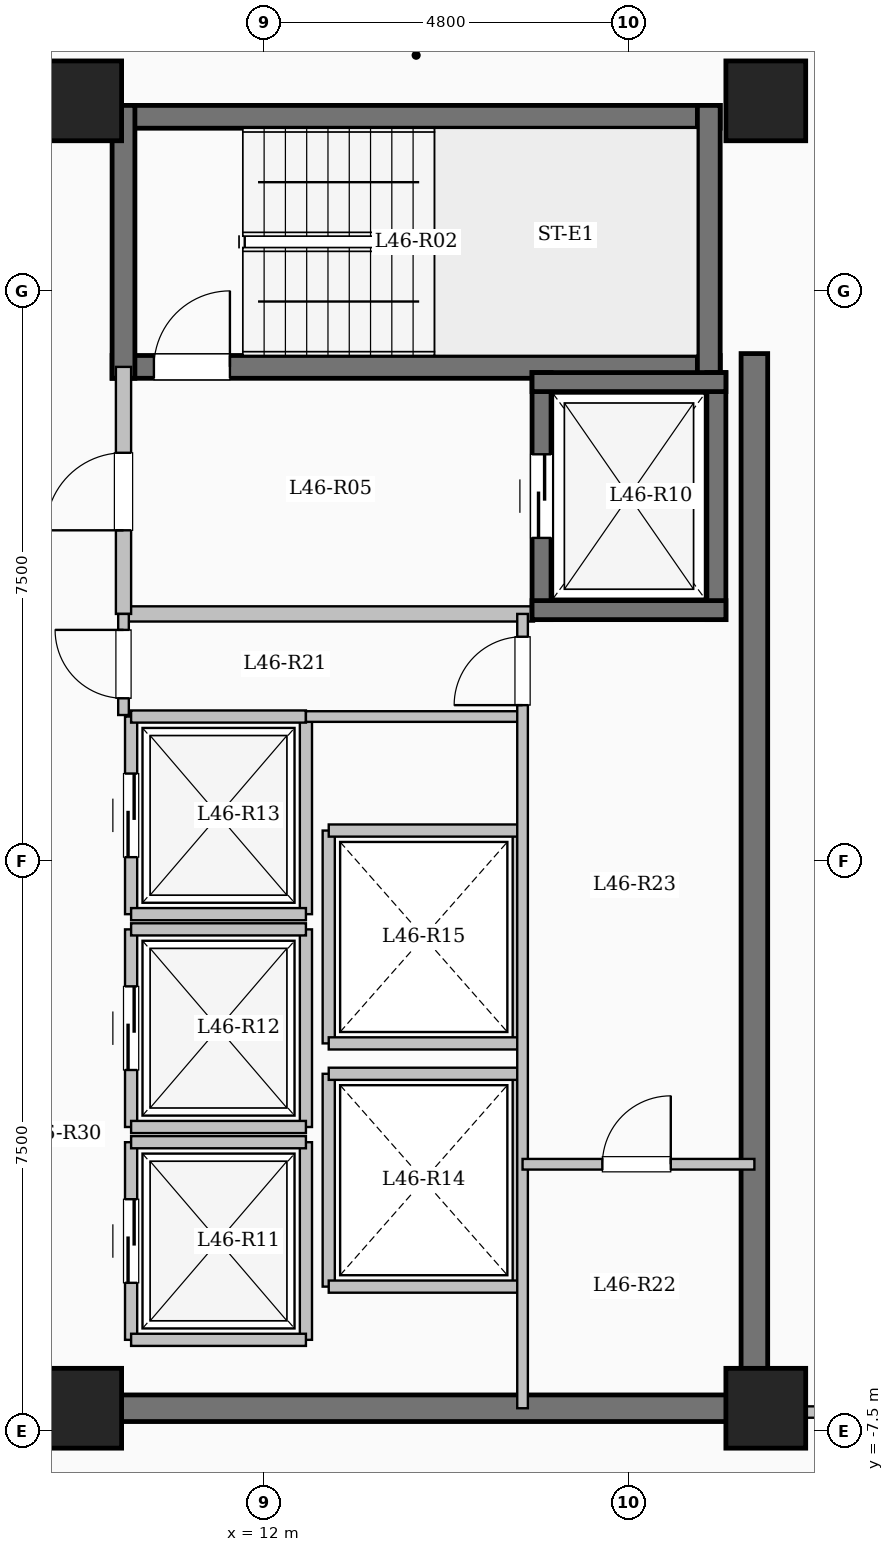
"""IFC4 building model, lengths in metres.
Left out: names, types, materials, properties, quantities, classifications, styles, units other than length and angle.
Written with IfcOpenShell. Run it as: python <this file> out.ifc"""

import sys

from ifc_helpers import new_model, si_unit, direction, frame, frame_2d, origin, origin_2d, place, context, subcontext, project, spatial, rectangle, extrude, element, fill, save


model = new_model("IFC4")
c1 = context("Model", 3, precision=1e-05, world=origin(), true_north=direction((0.0, 1.0)))
c2 = subcontext(c1, "Body", "Model", "MODEL_VIEW")
j1 = project(units=[si_unit("LENGTHUNIT", "METRE"), si_unit("PLANEANGLEUNIT", "RADIAN")], contexts=[c1])
p1 = place(None, origin())
s1 = spatial("IfcSite", under=j1, at=p1, CompositionType="ELEMENT")
p2 = place(p1, origin())
s2 = spatial("IfcBuilding", under=s1, at=p2, CompositionType="ELEMENT")
p3 = place(p2, frame((0.0, 0.0, 169.45)))
s3 = spatial("IfcBuildingStorey", under=s2, at=p3, CompositionType="ELEMENT", Elevation=169.45)
for number, where, z_axis, x_axis in (
    (1, (9.6, -7.2, 0.0), (0.0, 0.0, 1.0), (1.0, 0.0, 0.0)),
    (2, (9.6, 10.0, 0.0), (0.0, 0.0, 1.0), (1.0, 0.0, 0.0)),
    (3, (18.6, -7.2, 0.0), (0.0, 0.0, 1.0), (1.0, 0.0, 0.0)),
    (4, (18.6, 10.0, 0.0), (0.0, 0.0, 1.0), (1.0, 0.0, 0.0)),
):
    element("IfcColumn", number, at=place(p3, frame(where, z_axis=z_axis, x_axis=x_axis)), inside=s3, PredefinedType="COLUMN", context=c2, shape_type="SweptSolid", body=[
        extrude(rectangle(XDim=1.05, YDim=1.05, at=origin_2d()), origin(), (0.0, 0.0, 1.0), 3.35),
    ])
p4 = place(p3, frame((10.0, 9.79, 0.0), z_axis=(0.0, 0.0, 1.0), x_axis=(1.0, 0.0, 0.0)))
e5 = element("IfcWall", 5, at=p4, inside=s3, PredefinedType="SHEAR", context=c2, shape_type="SweptSolid", body=[
    extrude(rectangle(XDim=8.0, YDim=0.3, at=frame_2d((4.0, 0.0))), origin(), (0.0, 0.0, 1.0), 3.35),
])
p5 = place(p3, frame((10.0, 6.5, 0.0), z_axis=(0.0, 0.0, 1.0), x_axis=(1.0, 0.0, 0.0)))
e6 = element("IfcWall", 6, at=p5, inside=s3, PredefinedType="SHEAR", context=c2, shape_type="SweptSolid", body=[
    extrude(rectangle(XDim=8.0, YDim=0.3, at=frame_2d((4.0, 0.0))), origin(), (0.0, 0.0, 1.0), 3.35),
])
p6 = place(p5, frame((0.55, 0.0, 0.0)))
e7 = element("IfcOpeningElement", 7, at=p6, cuts=e6, PredefinedType="OPENING", context=c2, shape_type="SweptSolid", body=[
    extrude(rectangle(XDim=1.0, YDim=2.15, at=frame_2d((0.5, 1.075))), frame((0.0, 0.16, 0.0), z_axis=(0.0, -1.0, 0.0), x_axis=(1.0, 0.0, 0.0)), (0.0, 0.0, 1.0), 0.32),
])
for number, where, z_axis, x_axis in (
    (8, (10.15, 6.35, 0.0), (0.0, 0.0, 1.0), (0.0, 1.0, 0.0)),
    (9, (17.85, 6.35, 0.0), (0.0, 0.0, 1.0), (0.0, 1.0, 0.0)),
):
    element("IfcWall", number, at=place(p3, frame(where, z_axis=z_axis, x_axis=x_axis)), inside=s3, PredefinedType="SHEAR", context=c2, shape_type="SweptSolid", body=[
        extrude(rectangle(XDim=3.59, YDim=0.3, at=frame_2d((1.795, 0.0))), origin(), (0.0, 0.0, 1.0), 3.35),
    ])
p7 = place(p3, frame((10.15, 3.25, 0.0), z_axis=(0.0, 0.0, 1.0), x_axis=(1.0, 0.0, 0.0)))
e10 = element("IfcWall", 10, at=p7, inside=s3, PredefinedType="SOLIDWALL", context=c2, shape_type="SweptSolid", body=[
    extrude(rectangle(XDim=5.4, YDim=0.2, at=frame_2d((2.7, 0.0))), origin(), (0.0, 0.0, 1.0), 3.05),
])
p8 = place(p3, frame((10.15, 3.25, 0.0), z_axis=(0.0, 0.0, 1.0), x_axis=(0.0, 1.0, 0.0)))
e11 = element("IfcWall", 11, at=p8, inside=s3, PredefinedType="SOLIDWALL", context=c2, shape_type="SweptSolid", body=[
    extrude(rectangle(XDim=3.25, YDim=0.2, at=frame_2d((1.625, 0.0))), origin(), (0.0, 0.0, 1.0), 3.05),
])
p9 = place(p8, frame((1.1, 0.0, 0.0)))
e12 = element("IfcOpeningElement", 12, at=p9, cuts=e11, PredefinedType="OPENING", context=c2, shape_type="SweptSolid", body=[
    extrude(rectangle(XDim=1.02, YDim=2.15, at=frame_2d((0.51, 1.075))), frame((0.0, 0.11, 0.0), z_axis=(0.0, -1.0, 0.0), x_axis=(1.0, 0.0, 0.0)), (0.0, 0.0, 1.0), 0.22),
])
p10 = place(p3, frame((15.65, 3.175, 0.0), z_axis=(0.0, 0.0, 1.0), x_axis=(0.0, 1.0, 0.0)))
e13 = element("IfcWall", 13, at=p10, inside=s3, PredefinedType="SHEAR", context=c2, shape_type="SweptSolid", body=[
    extrude(rectangle(XDim=3.25, YDim=0.25, at=frame_2d((1.625, 0.0))), origin(), (0.0, 0.0, 1.0), 3.35),
])
p11 = place(p10, frame((1.075, 0.0, 0.0)))
e14 = element("IfcOpeningElement", 14, at=p11, cuts=e13, PredefinedType="OPENING", context=c2, shape_type="SweptSolid", body=[
    extrude(rectangle(XDim=1.1, YDim=2.15, at=frame_2d((0.55, 1.075))), frame((0.0, 0.135, 0.0), z_axis=(0.0, -1.0, 0.0), x_axis=(1.0, 0.0, 0.0)), (0.0, 0.0, 1.0), 0.27),
])
p12 = place(p3, frame((17.95, 3.175, 0.0), z_axis=(0.0, 0.0, 1.0), x_axis=(0.0, 1.0, 0.0)))
e15 = element("IfcWall", 15, at=p12, inside=s3, PredefinedType="SHEAR", context=c2, shape_type="SweptSolid", body=[
    extrude(rectangle(XDim=3.25, YDim=0.25, at=frame_2d((1.625, 0.0))), origin(), (0.0, 0.0, 1.0), 3.35),
])
for number, where, z_axis, x_axis in (
    (16, (15.525, 3.3, 0.0), (0.0, 0.0, 1.0), (1.0, 0.0, 0.0)),
    (17, (15.525, 6.3, 0.0), (0.0, 0.0, 1.0), (1.0, 0.0, 0.0)),
):
    element("IfcWall", number, at=place(p3, frame(where, z_axis=z_axis, x_axis=x_axis)), inside=s3, PredefinedType="SHEAR", context=c2, shape_type="SweptSolid", body=[
        extrude(rectangle(XDim=2.55, YDim=0.25, at=frame_2d((1.275, 0.0))), origin(), (0.0, 0.0, 1.0), 3.35),
    ])
p13 = place(p3, frame((10.25, -6.3, 0.0), z_axis=(0.0, 0.0, 1.0), x_axis=(0.0, 1.0, 0.0)))
e18 = element("IfcWall", 18, at=p13, inside=s3, PredefinedType="SOLIDWALL", context=c2, shape_type="SweptSolid", body=[
    extrude(rectangle(XDim=2.6, YDim=0.16, at=frame_2d((1.3, 0.0))), origin(), (0.0, 0.0, 1.0), 3.05),
])
p14 = place(p13, frame((0.75, 0.0, 0.0)))
e19 = element("IfcOpeningElement", 19, at=p14, cuts=e18, PredefinedType="OPENING", context=c2, shape_type="SweptSolid", body=[
    extrude(rectangle(XDim=1.1, YDim=2.15, at=frame_2d((0.55, 1.075))), frame((0.0, 0.09, 0.0), z_axis=(0.0, -1.0, 0.0), x_axis=(1.0, 0.0, 0.0)), (0.0, 0.0, 1.0), 0.18),
])
p15 = place(p3, frame((12.55, -6.3, 0.0), z_axis=(0.0, 0.0, 1.0), x_axis=(0.0, 1.0, 0.0)))
e20 = element("IfcWall", 20, at=p15, inside=s3, PredefinedType="SOLIDWALL", context=c2, shape_type="SweptSolid", body=[
    extrude(rectangle(XDim=2.6, YDim=0.16, at=frame_2d((1.3, 0.0))), origin(), (0.0, 0.0, 1.0), 3.05),
])
for number, where, z_axis, x_axis in (
    (21, (10.25, -6.3, 0.0), (0.0, 0.0, 1.0), (1.0, 0.0, 0.0)),
    (22, (10.25, -3.7, 0.0), (0.0, 0.0, 1.0), (1.0, 0.0, 0.0)),
):
    element("IfcWall", number, at=place(p3, frame(where, z_axis=z_axis, x_axis=x_axis)), inside=s3, PredefinedType="SOLIDWALL", context=c2, shape_type="SweptSolid", body=[
        extrude(rectangle(XDim=2.3, YDim=0.16, at=frame_2d((1.15, 0.0))), origin(), (0.0, 0.0, 1.0), 3.05),
    ])
p16 = place(p3, frame((10.25, -3.5, 0.0), z_axis=(0.0, 0.0, 1.0), x_axis=(0.0, 1.0, 0.0)))
e23 = element("IfcWall", 23, at=p16, inside=s3, PredefinedType="SOLIDWALL", context=c2, shape_type="SweptSolid", body=[
    extrude(rectangle(XDim=2.6, YDim=0.16, at=frame_2d((1.3, 0.0))), origin(), (0.0, 0.0, 1.0), 3.05),
])
p17 = place(p16, frame((0.75, 0.0, 0.0)))
e24 = element("IfcOpeningElement", 24, at=p17, cuts=e23, PredefinedType="OPENING", context=c2, shape_type="SweptSolid", body=[
    extrude(rectangle(XDim=1.1, YDim=2.15, at=frame_2d((0.55, 1.075))), frame((0.0, 0.09, 0.0), z_axis=(0.0, -1.0, 0.0), x_axis=(1.0, 0.0, 0.0)), (0.0, 0.0, 1.0), 0.18),
])
p18 = place(p3, frame((12.55, -3.5, 0.0), z_axis=(0.0, 0.0, 1.0), x_axis=(0.0, 1.0, 0.0)))
e25 = element("IfcWall", 25, at=p18, inside=s3, PredefinedType="SOLIDWALL", context=c2, shape_type="SweptSolid", body=[
    extrude(rectangle(XDim=2.6, YDim=0.16, at=frame_2d((1.3, 0.0))), origin(), (0.0, 0.0, 1.0), 3.05),
])
for number, where, z_axis, x_axis in (
    (26, (10.25, -3.5, 0.0), (0.0, 0.0, 1.0), (1.0, 0.0, 0.0)),
    (27, (10.25, -0.9, 0.0), (0.0, 0.0, 1.0), (1.0, 0.0, 0.0)),
):
    element("IfcWall", number, at=place(p3, frame(where, z_axis=z_axis, x_axis=x_axis)), inside=s3, PredefinedType="SOLIDWALL", context=c2, shape_type="SweptSolid", body=[
        extrude(rectangle(XDim=2.3, YDim=0.16, at=frame_2d((1.15, 0.0))), origin(), (0.0, 0.0, 1.0), 3.05),
    ])
p19 = place(p3, frame((10.25, -0.7, 0.0), z_axis=(0.0, 0.0, 1.0), x_axis=(0.0, 1.0, 0.0)))
e28 = element("IfcWall", 28, at=p19, inside=s3, PredefinedType="SOLIDWALL", context=c2, shape_type="SweptSolid", body=[
    extrude(rectangle(XDim=2.6, YDim=0.16, at=frame_2d((1.3, 0.0))), origin(), (0.0, 0.0, 1.0), 3.05),
])
p20 = place(p19, frame((0.75, 0.0, 0.0)))
e29 = element("IfcOpeningElement", 29, at=p20, cuts=e28, PredefinedType="OPENING", context=c2, shape_type="SweptSolid", body=[
    extrude(rectangle(XDim=1.1, YDim=2.15, at=frame_2d((0.55, 1.075))), frame((0.0, 0.09, 0.0), z_axis=(0.0, -1.0, 0.0), x_axis=(1.0, 0.0, 0.0)), (0.0, 0.0, 1.0), 0.18),
])
p21 = place(p3, frame((12.55, -0.7, 0.0), z_axis=(0.0, 0.0, 1.0), x_axis=(0.0, 1.0, 0.0)))
e30 = element("IfcWall", 30, at=p21, inside=s3, PredefinedType="SOLIDWALL", context=c2, shape_type="SweptSolid", body=[
    extrude(rectangle(XDim=2.6, YDim=0.16, at=frame_2d((1.3, 0.0))), origin(), (0.0, 0.0, 1.0), 3.05),
])
for number, where, z_axis, x_axis in (
    (31, (10.25, -0.7, 0.0), (0.0, 0.0, 1.0), (1.0, 0.0, 0.0)),
    (32, (10.25, 1.9, 0.0), (0.0, 0.0, 1.0), (1.0, 0.0, 0.0)),
):
    element("IfcWall", number, at=place(p3, frame(where, z_axis=z_axis, x_axis=x_axis)), inside=s3, PredefinedType="SOLIDWALL", context=c2, shape_type="SweptSolid", body=[
        extrude(rectangle(XDim=2.3, YDim=0.16, at=frame_2d((1.15, 0.0))), origin(), (0.0, 0.0, 1.0), 3.05),
    ])
for number, where, z_axis, x_axis in (
    (33, (12.85, -5.6, 0.0), (0.0, 0.0, 1.0), (0.0, 1.0, 0.0)),
    (34, (15.35, -5.6, 0.0), (0.0, 0.0, 1.0), (0.0, 1.0, 0.0)),
):
    element("IfcWall", number, at=place(p3, frame(where, z_axis=z_axis, x_axis=x_axis)), inside=s3, PredefinedType="SOLIDWALL", context=c2, shape_type="SweptSolid", body=[
        extrude(rectangle(XDim=2.8, YDim=0.16, at=frame_2d((1.4, 0.0))), origin(), (0.0, 0.0, 1.0), 3.05),
    ])
for number, where, z_axis, x_axis in (
    (35, (12.85, -5.6, 0.0), (0.0, 0.0, 1.0), (1.0, 0.0, 0.0)),
    (36, (12.85, -2.8, 0.0), (0.0, 0.0, 1.0), (1.0, 0.0, 0.0)),
):
    element("IfcWall", number, at=place(p3, frame(where, z_axis=z_axis, x_axis=x_axis)), inside=s3, PredefinedType="SOLIDWALL", context=c2, shape_type="SweptSolid", body=[
        extrude(rectangle(XDim=2.5, YDim=0.16, at=frame_2d((1.25, 0.0))), origin(), (0.0, 0.0, 1.0), 3.05),
    ])
for number, where, z_axis, x_axis in (
    (37, (12.85, -2.4, 0.0), (0.0, 0.0, 1.0), (0.0, 1.0, 0.0)),
    (38, (15.35, -2.4, 0.0), (0.0, 0.0, 1.0), (0.0, 1.0, 0.0)),
):
    element("IfcWall", number, at=place(p3, frame(where, z_axis=z_axis, x_axis=x_axis)), inside=s3, PredefinedType="SOLIDWALL", context=c2, shape_type="SweptSolid", body=[
        extrude(rectangle(XDim=2.8, YDim=0.16, at=frame_2d((1.4, 0.0))), origin(), (0.0, 0.0, 1.0), 3.05),
    ])
for number, where, z_axis, x_axis in (
    (39, (12.85, -2.4, 0.0), (0.0, 0.0, 1.0), (1.0, 0.0, 0.0)),
    (40, (12.85, 0.4, 0.0), (0.0, 0.0, 1.0), (1.0, 0.0, 0.0)),
):
    element("IfcWall", number, at=place(p3, frame(where, z_axis=z_axis, x_axis=x_axis)), inside=s3, PredefinedType="SOLIDWALL", context=c2, shape_type="SweptSolid", body=[
        extrude(rectangle(XDim=2.5, YDim=0.16, at=frame_2d((1.25, 0.0))), origin(), (0.0, 0.0, 1.0), 3.05),
    ])
p22 = place(p3, frame((18.45, -7.375, 0.0), z_axis=(0.0, 0.0, 1.0), x_axis=(0.0, 1.0, 0.0)))
e41 = element("IfcWall", 41, at=p22, inside=s3, PredefinedType="SHEAR", context=c2, shape_type="SweptSolid", body=[
    extrude(rectangle(XDim=14.05, YDim=0.35, at=frame_2d((7.025, 0.0))), origin(), (0.0, 0.0, 1.0), 3.35),
])
p23 = place(p3, frame((10.075, -7.2, 0.0), z_axis=(0.0, 0.0, 1.0), x_axis=(1.0, 0.0, 0.0)))
e42 = element("IfcWall", 42, at=p23, inside=s3, PredefinedType="SHEAR", context=c2, shape_type="SweptSolid", body=[
    extrude(rectangle(XDim=8.55, YDim=0.35, at=frame_2d((4.275, 0.0))), origin(), (0.0, 0.0, 1.0), 3.35),
])
p24 = place(p3, frame((12.55, 1.9, 0.0), z_axis=(0.0, 0.0, 1.0), x_axis=(1.0, 0.0, 0.0)))
e43 = element("IfcWall", 43, at=p24, inside=s3, PredefinedType="PARTITIONING", context=c2, shape_type="SweptSolid", body=[
    extrude(rectangle(XDim=2.85, YDim=0.14, at=frame_2d((1.425, 0.0))), origin(), (0.0, 0.0, 1.0), 3.05),
])
p25 = place(p3, frame((10.15, 1.92, 0.0), z_axis=(0.0, 0.0, 1.0), x_axis=(0.0, 1.0, 0.0)))
e44 = element("IfcWall", 44, at=p25, inside=s3, PredefinedType="PARTITIONING", context=c2, shape_type="SweptSolid", body=[
    extrude(rectangle(XDim=1.33, YDim=0.14, at=frame_2d((0.665, 0.0))), origin(), (0.0, 0.0, 1.0), 3.05),
])
p26 = place(p25, frame((0.22, 0.0, 0.0)))
e45 = element("IfcOpeningElement", 45, at=p26, cuts=e44, PredefinedType="OPENING", context=c2, shape_type="SweptSolid", body=[
    extrude(rectangle(XDim=0.9, YDim=2.08, at=frame_2d((0.45, 1.04))), frame((0.0, 0.08, 0.0), z_axis=(0.0, -1.0, 0.0), x_axis=(1.0, 0.0, 0.0)), (0.0, 0.0, 1.0), 0.16),
])
p27 = place(p3, frame((15.4, -7.2, 0.0), z_axis=(0.0, 0.0, 1.0), x_axis=(0.0, 1.0, 0.0)))
e46 = element("IfcWall", 46, at=p27, inside=s3, PredefinedType="PARTITIONING", context=c2, shape_type="SweptSolid", body=[
    extrude(rectangle(XDim=10.45, YDim=0.14, at=frame_2d((5.225, 0.0))), origin(), (0.0, 0.0, 1.0), 3.05),
])
p28 = place(p27, frame((9.25, 0.0, 0.0)))
e47 = element("IfcOpeningElement", 47, at=p28, cuts=e46, PredefinedType="OPENING", context=c2, shape_type="SweptSolid", body=[
    extrude(rectangle(XDim=0.9, YDim=2.08, at=frame_2d((0.45, 1.04))), frame((0.0, 0.08, 0.0), z_axis=(0.0, -1.0, 0.0), x_axis=(1.0, 0.0, 0.0)), (0.0, 0.0, 1.0), 0.16),
])
p29 = place(p3, frame((15.4, -3.99, 0.0), z_axis=(0.0, 0.0, 1.0), x_axis=(1.0, 0.0, 0.0)))
e48 = element("IfcWall", 48, at=p29, inside=s3, PredefinedType="PARTITIONING", context=c2, shape_type="SweptSolid", body=[
    extrude(rectangle(XDim=3.05, YDim=0.14, at=frame_2d((1.525, 0.0))), origin(), (0.0, 0.0, 1.0), 3.05),
])
p30 = place(p29, frame((1.05, 0.0, 0.0)))
e49 = element("IfcOpeningElement", 49, at=p30, cuts=e48, PredefinedType="OPENING", context=c2, shape_type="SweptSolid", body=[
    extrude(rectangle(XDim=0.9, YDim=2.08, at=frame_2d((0.45, 1.04))), frame((0.0, 0.08, 0.0), z_axis=(0.0, -1.0, 0.0), x_axis=(1.0, 0.0, 0.0)), (0.0, 0.0, 1.0), 0.16),
])
p31 = place(p3, frame((18.45, -7.25, 0.0), z_axis=(0.0, 0.0, 1.0), x_axis=(1.0, 0.0, 0.0)))
e50 = element("IfcWall", 50, at=p31, inside=s3, PredefinedType="PARTITIONING", context=c2, shape_type="SweptSolid", body=[
    extrude(rectangle(XDim=6.63, YDim=0.15, at=frame_2d((3.315, 0.0))), origin(), (0.0, 0.0, 1.0), 3.05),
])
p32 = place(p31, frame((1.95, 0.0, 0.0)))
e51 = element("IfcOpeningElement", 51, at=p32, cuts=e50, PredefinedType="OPENING", context=c2, shape_type="SweptSolid", body=[
    extrude(rectangle(XDim=1.08, YDim=2.15, at=frame_2d((0.54, 1.075))), frame((0.0, 0.085, 0.0), z_axis=(0.0, -1.0, 0.0), x_axis=(1.0, 0.0, 0.0)), (0.0, 0.0, 1.0), 0.17),
])
p33 = place(p6, origin())
e52 = element("IfcDoor", 52, at=p33, inside=s3, OperationType="SINGLE_SWING_RIGHT", PredefinedType="DOOR", context=c2, shape_type="SweptSolid", body=[
    extrude(rectangle(XDim=1.0, YDim=2.15, at=frame_2d((0.5, 1.075))), frame((0.0, 0.025, 0.0), z_axis=(0.0, -1.0, 0.0), x_axis=(1.0, 0.0, 0.0)), (0.0, 0.0, 1.0), 0.05),
])
fill(e7, e52)
p34 = place(p9, origin())
e53 = element("IfcDoor", 53, at=p34, inside=s3, OperationType="SINGLE_SWING_LEFT", PredefinedType="DOOR", context=c2, shape_type="SweptSolid", body=[
    extrude(rectangle(XDim=1.02, YDim=2.15, at=frame_2d((0.51, 1.075))), frame((0.0, 0.025, 0.0), z_axis=(0.0, -1.0, 0.0), x_axis=(1.0, 0.0, 0.0)), (0.0, 0.0, 1.0), 0.05),
])
fill(e12, e53)
p35 = place(p11, origin())
e54 = element("IfcDoor", 54, at=p35, inside=s3, OperationType="SLIDING_TO_LEFT", PredefinedType="DOOR", context=c2, shape_type="SweptSolid", body=[
    extrude(rectangle(XDim=1.1, YDim=2.15, at=frame_2d((0.55, 1.075))), frame((0.0, 0.025, 0.0), z_axis=(0.0, -1.0, 0.0), x_axis=(1.0, 0.0, 0.0)), (0.0, 0.0, 1.0), 0.05),
])
fill(e14, e54)
p36 = place(p14, origin())
e55 = element("IfcDoor", 55, at=p36, inside=s3, OperationType="SLIDING_TO_LEFT", PredefinedType="DOOR", context=c2, shape_type="SweptSolid", body=[
    extrude(rectangle(XDim=1.1, YDim=2.15, at=frame_2d((0.55, 1.075))), frame((0.0, 0.025, 0.0), z_axis=(0.0, -1.0, 0.0), x_axis=(1.0, 0.0, 0.0)), (0.0, 0.0, 1.0), 0.05),
])
fill(e19, e55)
p37 = place(p17, origin())
e56 = element("IfcDoor", 56, at=p37, inside=s3, OperationType="SLIDING_TO_LEFT", PredefinedType="DOOR", context=c2, shape_type="SweptSolid", body=[
    extrude(rectangle(XDim=1.1, YDim=2.15, at=frame_2d((0.55, 1.075))), frame((0.0, 0.025, 0.0), z_axis=(0.0, -1.0, 0.0), x_axis=(1.0, 0.0, 0.0)), (0.0, 0.0, 1.0), 0.05),
])
fill(e24, e56)
p38 = place(p20, origin())
e57 = element("IfcDoor", 57, at=p38, inside=s3, OperationType="SLIDING_TO_LEFT", PredefinedType="DOOR", context=c2, shape_type="SweptSolid", body=[
    extrude(rectangle(XDim=1.1, YDim=2.15, at=frame_2d((0.55, 1.075))), frame((0.0, 0.025, 0.0), z_axis=(0.0, -1.0, 0.0), x_axis=(1.0, 0.0, 0.0)), (0.0, 0.0, 1.0), 0.05),
])
fill(e29, e57)
p39 = place(p26, origin())
e58 = element("IfcDoor", 58, at=p39, inside=s3, OperationType="SINGLE_SWING_RIGHT", PredefinedType="DOOR", context=c2, shape_type="SweptSolid", body=[
    extrude(rectangle(XDim=0.9, YDim=2.08, at=frame_2d((0.45, 1.04))), frame((0.0, 0.025, 0.0), z_axis=(0.0, -1.0, 0.0), x_axis=(1.0, 0.0, 0.0)), (0.0, 0.0, 1.0), 0.05),
])
fill(e45, e58)
p40 = place(p28, origin())
e59 = element("IfcDoor", 59, at=p40, inside=s3, OperationType="SINGLE_SWING_LEFT", PredefinedType="DOOR", context=c2, shape_type="SweptSolid", body=[
    extrude(rectangle(XDim=0.9, YDim=2.08, at=frame_2d((0.45, 1.04))), frame((0.0, 0.025, 0.0), z_axis=(0.0, -1.0, 0.0), x_axis=(1.0, 0.0, 0.0)), (0.0, 0.0, 1.0), 0.05),
])
fill(e47, e59)
p41 = place(p30, origin())
e60 = element("IfcDoor", 60, at=p41, inside=s3, OperationType="SINGLE_SWING_RIGHT", PredefinedType="DOOR", context=c2, shape_type="SweptSolid", body=[
    extrude(rectangle(XDim=0.9, YDim=2.08, at=frame_2d((0.45, 1.04))), frame((0.0, 0.025, 0.0), z_axis=(0.0, -1.0, 0.0), x_axis=(1.0, 0.0, 0.0)), (0.0, 0.0, 1.0), 0.05),
])
fill(e49, e60)
save(model, sys.argv[1])
